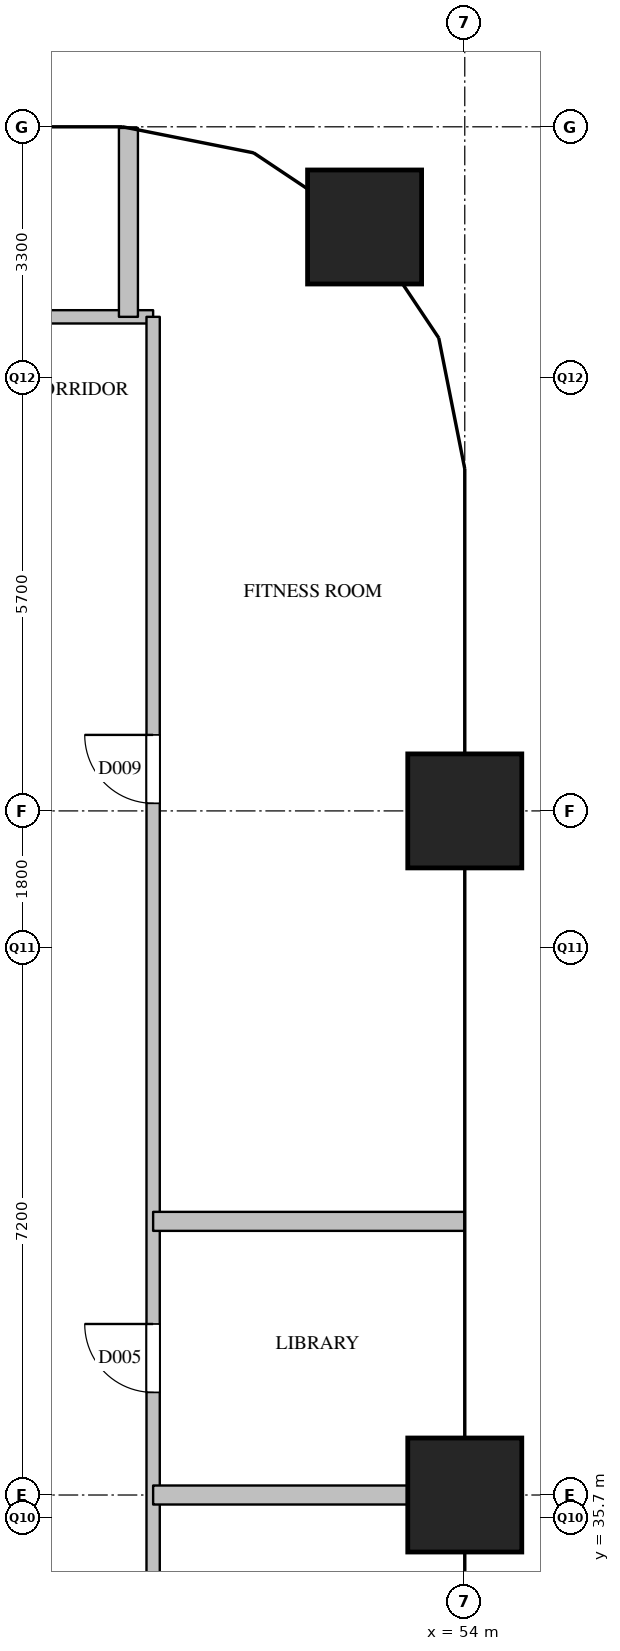
"""IFC4 building model, lengths in metres.
Left out: names, types, materials, properties, quantities, classifications, styles, units other than length and angle.
Written with IfcOpenShell. Run it as: python <this file> out.ifc"""

import sys

from ifc_helpers import new_model, si_unit, direction, frame, frame_2d, origin, origin_2d, place, context, subcontext, project, spatial, rectangle, extrude, element, fill, save


model = new_model("IFC4")
c1 = context("Model", 3, precision=1e-05, world=origin(), true_north=direction((0.0, 1.0)))
c2 = subcontext(c1, "Body", "Model", "MODEL_VIEW")
j1 = project(units=[si_unit("LENGTHUNIT", "METRE"), si_unit("PLANEANGLEUNIT", "RADIAN")], contexts=[c1])
p1 = place(None, origin())
s1 = spatial("IfcSite", under=j1, at=p1, CompositionType="ELEMENT")
p2 = place(p1, origin())
s2 = spatial("IfcBuilding", under=s1, at=p2, CompositionType="ELEMENT")
p3 = place(p2, frame((0.0, 0.0, 166.1)))
s3 = spatial("IfcBuildingStorey", under=s2, at=p3, CompositionType="ELEMENT", Elevation=166.1)
for number, where, z_axis, x_axis in (
    (1, (54.0, 36.0, 0.0), (0.0, 0.0, 1.0), (1.0, 0.0, 0.0)),
    (2, (54.0, 45.0, 0.0), (0.0, 0.0, 1.0), (1.0, 0.0, 0.0)),
    (3, (52.682, 52.682, 0.0), (0.0, 0.0, 1.0), (1.0, 0.0, 0.0)),
):
    element("IfcColumn", number, at=place(p3, frame(where, z_axis=z_axis, x_axis=x_axis)), inside=s3, PredefinedType="COLUMN", context=c2, shape_type="SweptSolid", body=[
        extrude(rectangle(XDim=1.5, YDim=1.5, at=origin_2d()), origin(), (0.0, 0.0, 1.0), 3.9),
    ])
p4 = place(p3, frame((34.5, 51.5, 0.0), z_axis=(0.0, 0.0, 1.0), x_axis=(1.0, 0.0, 0.0)))
e4 = element("IfcWall", 4, at=p4, inside=s3, PredefinedType="PARTITIONING", context=c2, shape_type="SweptSolid", body=[
    extrude(rectangle(XDim=15.4, YDim=0.175, at=frame_2d((7.7, 0.0))), origin(), (0.0, 0.0, 1.0), 3.6),
])
p5 = place(p4, frame((9.637, 0.0, 0.0)))
e5 = element("IfcOpeningElement", 5, at=p5, cuts=e4, PredefinedType="OPENING", context=c2, shape_type="SweptSolid", body=[
    extrude(rectangle(XDim=0.9, YDim=2.1, at=frame_2d((0.45, 1.05))), frame((0.0, 0.097, 0.0), z_axis=(0.0, -1.0, 0.0), x_axis=(1.0, 0.0, 0.0)), (0.0, 0.0, 1.0), 0.195),
])
p6 = place(p3, frame((49.9, 28.5, 0.0), z_axis=(0.0, 0.0, 1.0), x_axis=(0.0, 1.0, 0.0)))
e6 = element("IfcWall", 6, at=p6, inside=s3, PredefinedType="PARTITIONING", context=c2, shape_type="SweptSolid", body=[
    extrude(rectangle(XDim=23.0, YDim=0.175, at=frame_2d((11.5, 0.0))), origin(), (0.0, 0.0, 1.0), 3.6),
])
p7 = place(p6, frame((3.3, 0.0, 0.0)))
e7 = element("IfcOpeningElement", 7, at=p7, cuts=e6, PredefinedType="OPENING", context=c2, shape_type="SweptSolid", body=[
    extrude(rectangle(XDim=0.9, YDim=2.1, at=frame_2d((0.45, 1.05))), frame((0.0, 0.097, 0.0), z_axis=(0.0, -1.0, 0.0), x_axis=(1.0, 0.0, 0.0)), (0.0, 0.0, 1.0), 0.195),
])
p8 = place(p6, frame((8.85, 0.0, 0.0)))
e8 = element("IfcOpeningElement", 8, at=p8, cuts=e6, PredefinedType="OPENING", context=c2, shape_type="SweptSolid", body=[
    extrude(rectangle(XDim=0.9, YDim=2.1, at=frame_2d((0.45, 1.05))), frame((0.0, 0.097, 0.0), z_axis=(0.0, -1.0, 0.0), x_axis=(1.0, 0.0, 0.0)), (0.0, 0.0, 1.0), 0.195),
])
p9 = place(p6, frame((16.6, 0.0, 0.0)))
e9 = element("IfcOpeningElement", 9, at=p9, cuts=e6, PredefinedType="OPENING", context=c2, shape_type="SweptSolid", body=[
    extrude(rectangle(XDim=0.9, YDim=2.1, at=frame_2d((0.45, 1.05))), frame((0.0, 0.097, 0.0), z_axis=(0.0, -1.0, 0.0), x_axis=(1.0, 0.0, 0.0)), (0.0, 0.0, 1.0), 0.195),
])
p10 = place(p3, frame((49.9, 36.0, 0.0), z_axis=(0.0, 0.0, 1.0), x_axis=(1.0, 0.0, 0.0)))
e10 = element("IfcWall", 10, at=p10, inside=s3, PredefinedType="PARTITIONING", context=c2, shape_type="SweptSolid", body=[
    extrude(rectangle(XDim=4.1, YDim=0.25, at=frame_2d((2.05, 0.0))), origin(), (0.0, 0.0, 1.0), 3.6),
])
p11 = place(p3, frame((49.9, 39.6, 0.0), z_axis=(0.0, 0.0, 1.0), x_axis=(1.0, 0.0, 0.0)))
e11 = element("IfcWall", 11, at=p11, inside=s3, PredefinedType="PARTITIONING", context=c2, shape_type="SweptSolid", body=[
    extrude(rectangle(XDim=4.1, YDim=0.25, at=frame_2d((2.05, 0.0))), origin(), (0.0, 0.0, 1.0), 2.6),
])
p12 = place(p3, frame((49.575, 51.5, 0.0), z_axis=(0.0, 0.0, 1.0), x_axis=(0.0, 1.0, 0.0)))
e12 = element("IfcWall", 12, at=p12, inside=s3, PredefinedType="PARTITIONING", context=c2, shape_type="SweptSolid", body=[
    extrude(rectangle(XDim=2.485, YDim=0.25, at=frame_2d((1.243, 0.0))), origin(), (0.0, 0.0, 1.0), 2.6),
])
p13 = place(p8, origin())
e13 = element("IfcDoor", 13, at=p13, inside=s3, OperationType="SINGLE_SWING_RIGHT", PredefinedType="DOOR", context=c2, shape_type="SweptSolid", body=[
    extrude(rectangle(XDim=0.9, YDim=2.1, at=frame_2d((0.45, 1.05))), frame((0.0, 0.025, 0.0), z_axis=(0.0, -1.0, 0.0), x_axis=(1.0, 0.0, 0.0)), (0.0, 0.0, 1.0), 0.05),
])
fill(e8, e13)
p14 = place(p9, origin())
e14 = element("IfcDoor", 14, at=p14, inside=s3, OperationType="SINGLE_SWING_RIGHT", PredefinedType="DOOR", context=c2, shape_type="SweptSolid", body=[
    extrude(rectangle(XDim=0.9, YDim=2.1, at=frame_2d((0.45, 1.05))), frame((0.0, 0.025, 0.0), z_axis=(0.0, -1.0, 0.0), x_axis=(1.0, 0.0, 0.0)), (0.0, 0.0, 1.0), 0.05),
])
fill(e9, e14)
save(model, sys.argv[1])
